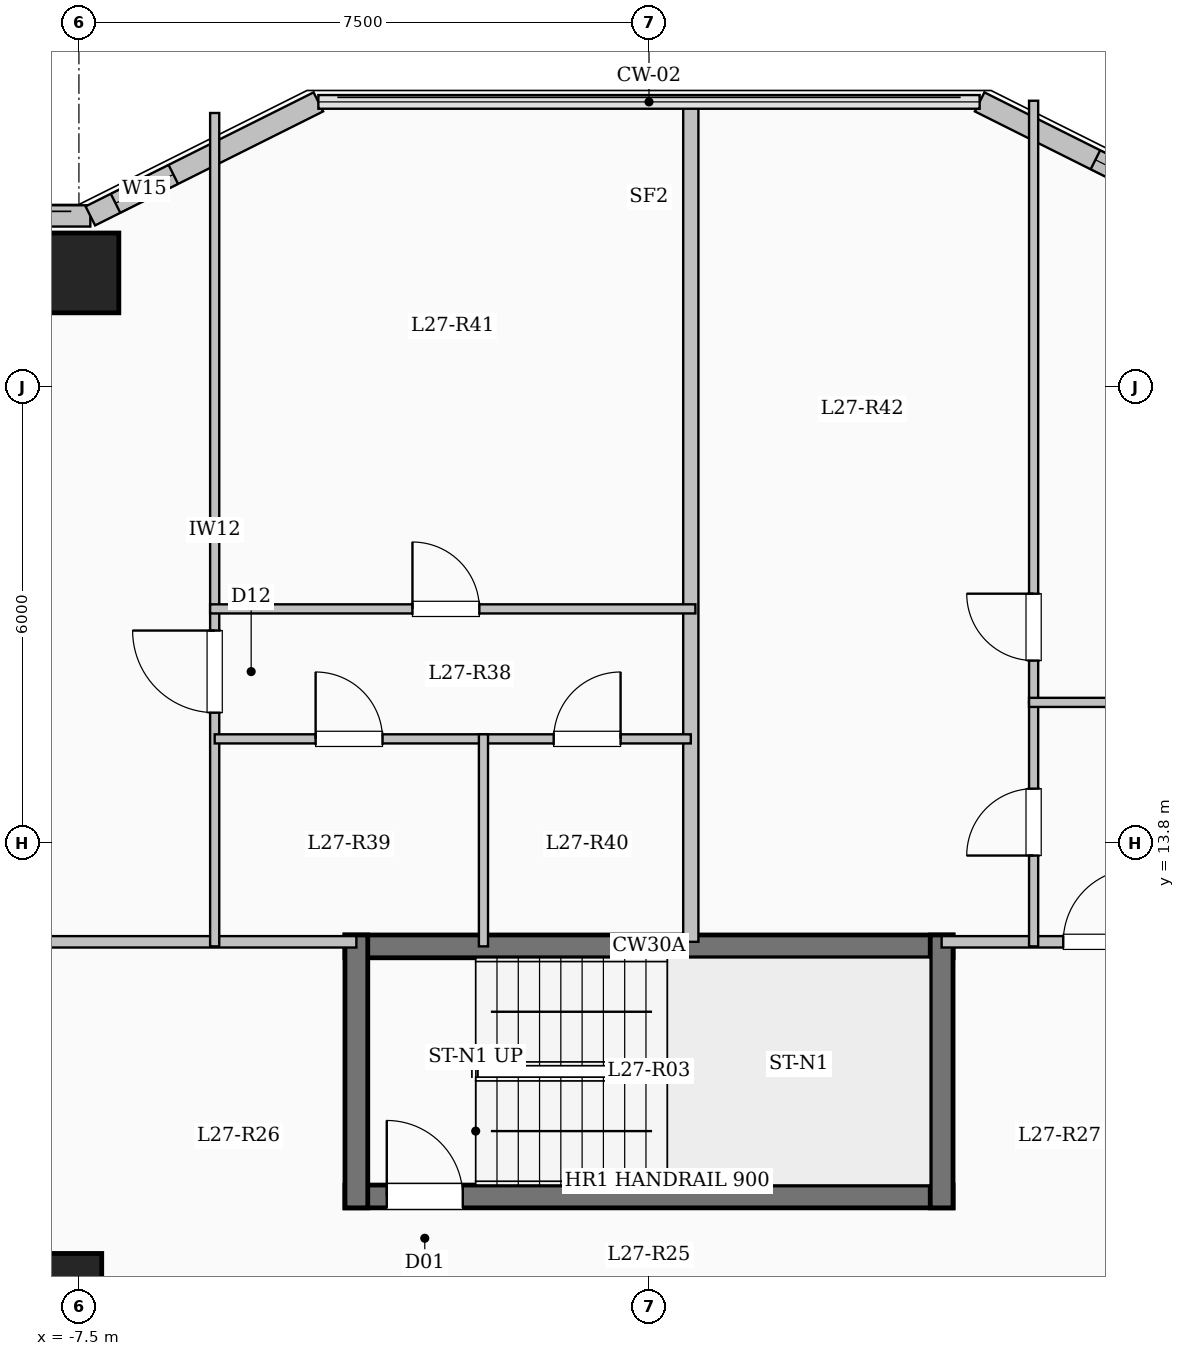
"""IFC4 building model, lengths in metres.
Left out: names, types, materials, properties, quantities, classifications, styles, units other than length and angle.
Written with IfcOpenShell. Run it as: python <this file> out.ifc"""

import sys

from ifc_helpers import new_model, si_unit, direction, frame, frame_2d, origin, origin_2d, place, context, subcontext, project, spatial, rectangle, extrude, element, fill, save


model = new_model("IFC4")
c1 = context("Model", 3, precision=1e-05, world=origin(), true_north=direction((0.0, 1.0)))
c2 = subcontext(c1, "Body", "Model", "MODEL_VIEW")
j1 = project(units=[si_unit("LENGTHUNIT", "METRE"), si_unit("PLANEANGLEUNIT", "RADIAN")], contexts=[c1])
p1 = place(None, origin())
s1 = spatial("IfcSite", under=j1, at=p1, CompositionType="ELEMENT")
p2 = place(p1, origin())
s2 = spatial("IfcBuilding", under=s1, at=p2, CompositionType="ELEMENT")
p3 = place(p2, frame((0.0, 0.0, 101.75)))
s3 = spatial("IfcBuildingStorey", under=s2, at=p3, CompositionType="ELEMENT", Elevation=101.75)
p4 = place(p3, frame((-7.8, 7.8, 0.0), z_axis=(0.0, 0.0, 1.0), x_axis=(1.0, 0.0, 0.0)))
e1 = element("IfcColumn", 1, at=p4, inside=s3, PredefinedType="COLUMN", context=c2, shape_type="SweptSolid", body=[
    extrude(rectangle(XDim=1.2, YDim=1.2, at=origin_2d()), origin(), (0.0, 0.0, 1.0), 3.35),
])
p5 = place(p3, frame((-7.5, 21.3, 0.0), z_axis=(0.0, 0.0, 1.0), x_axis=(1.0, 0.0, 0.0)))
e2 = element("IfcColumn", 2, at=p5, inside=s3, PredefinedType="COLUMN", context=c2, shape_type="SweptSolid", body=[
    extrude(rectangle(XDim=1.05, YDim=1.05, at=origin_2d()), origin(), (0.0, 0.0, 1.0), 3.35),
])
p6 = place(p3, frame((-21.15, 22.05, 0.0), z_axis=(0.0, 0.0, 1.0), x_axis=(1.0, 0.0, 0.0)))
e3 = element("IfcWall", 3, at=p6, inside=s3, PredefinedType="SOLIDWALL", context=c2, shape_type="SweptSolid", body=[
    extrude(rectangle(XDim=13.8, YDim=0.28, at=frame_2d((6.9, 0.0))), origin(), (0.0, 0.0, 1.0), 3.1),
])
p7 = place(p6, frame((1.158, 0.0, 0.9)))
e4 = element("IfcOpeningElement", 4, at=p7, cuts=e3, PredefinedType="OPENING", context=c2, shape_type="SweptSolid", body=[
    extrude(rectangle(XDim=2.4, YDim=1.8, at=frame_2d((1.2, 0.9))), frame((0.0, 0.15, 0.0), z_axis=(0.0, -1.0, 0.0), x_axis=(1.0, 0.0, 0.0)), (0.0, 0.0, 1.0), 0.3),
])
p8 = place(p6, frame((6.0, 0.0, 0.9)))
e5 = element("IfcOpeningElement", 5, at=p8, cuts=e3, PredefinedType="OPENING", context=c2, shape_type="SweptSolid", body=[
    extrude(rectangle(XDim=1.8, YDim=1.65, at=frame_2d((0.9, 0.825))), frame((0.0, 0.15, 0.0), z_axis=(0.0, -1.0, 0.0), x_axis=(1.0, 0.0, 0.0)), (0.0, 0.0, 1.0), 0.3),
])
p9 = place(p6, frame((10.342, 0.0, 0.9)))
e6 = element("IfcOpeningElement", 6, at=p9, cuts=e3, PredefinedType="OPENING", context=c2, shape_type="SweptSolid", body=[
    extrude(rectangle(XDim=2.4, YDim=1.8, at=frame_2d((1.2, 0.9))), frame((0.0, 0.15, 0.0), z_axis=(0.0, -1.0, 0.0), x_axis=(1.0, 0.0, 0.0)), (0.0, 0.0, 1.0), 0.3),
])
p10 = place(p3, frame((-7.35, 22.05, 0.0), z_axis=(0.0, 0.0, 1.0), x_axis=(0.894427191, 0.4472135955, 0.0)))
e7 = element("IfcWall", 7, at=p10, inside=s3, PredefinedType="SOLIDWALL", context=c2, shape_type="SweptSolid", body=[
    extrude(rectangle(XDim=3.354, YDim=0.28, at=frame_2d((1.677, 0.0))), origin(), (0.0, 0.0, 1.0), 3.1),
])
p11 = place(p10, frame((0.371, 0.0, 0.95)))
e8 = element("IfcOpeningElement", 8, at=p11, cuts=e7, PredefinedType="OPENING", context=c2, shape_type="SweptSolid", body=[
    extrude(rectangle(XDim=0.85, YDim=1.5, at=frame_2d((0.425, 0.75))), frame((0.0, 0.15, 0.0), z_axis=(0.0, -1.0, 0.0), x_axis=(1.0, 0.0, 0.0)), (0.0, 0.0, 1.0), 0.3),
])
p12 = place(p3, frame((4.35, 23.55, 0.0), z_axis=(0.0, 0.0, 1.0), x_axis=(0.894427191, -0.4472135955, 0.0)))
e9 = element("IfcWall", 9, at=p12, inside=s3, PredefinedType="SOLIDWALL", context=c2, shape_type="SweptSolid", body=[
    extrude(rectangle(XDim=3.354, YDim=0.28, at=frame_2d((1.677, 0.0))), origin(), (0.0, 0.0, 1.0), 3.1),
])
p13 = place(p12, frame((1.703, 0.0, 0.95)))
e10 = element("IfcOpeningElement", 10, at=p13, cuts=e9, PredefinedType="OPENING", context=c2, shape_type="SweptSolid", body=[
    extrude(rectangle(XDim=1.2, YDim=1.5, at=frame_2d((0.6, 0.75))), frame((0.0, 0.15, 0.0), z_axis=(0.0, -1.0, 0.0), x_axis=(1.0, 0.0, 0.0)), (0.0, 0.0, 1.0), 0.3),
])
p14 = place(p3, frame((-4.0, 12.44, 0.0), z_axis=(0.0, 0.0, 1.0), x_axis=(1.0, 0.0, 0.0)))
e11 = element("IfcWall", 11, at=p14, inside=s3, PredefinedType="SHEAR", context=c2, shape_type="SweptSolid", body=[
    extrude(rectangle(XDim=8.0, YDim=0.3, at=frame_2d((4.0, 0.0))), origin(), (0.0, 0.0, 1.0), 3.35),
])
p15 = place(p3, frame((-4.0, 9.15, 0.0), z_axis=(0.0, 0.0, 1.0), x_axis=(1.0, 0.0, 0.0)))
e12 = element("IfcWall", 12, at=p15, inside=s3, PredefinedType="SHEAR", context=c2, shape_type="SweptSolid", body=[
    extrude(rectangle(XDim=8.0, YDim=0.3, at=frame_2d((4.0, 0.0))), origin(), (0.0, 0.0, 1.0), 3.35),
])
p16 = place(p15, frame((0.55, 0.0, 0.0)))
e13 = element("IfcOpeningElement", 13, at=p16, cuts=e12, PredefinedType="OPENING", context=c2, shape_type="SweptSolid", body=[
    extrude(rectangle(XDim=1.0, YDim=2.15, at=frame_2d((0.5, 1.075))), frame((0.0, 0.16, 0.0), z_axis=(0.0, -1.0, 0.0), x_axis=(1.0, 0.0, 0.0)), (0.0, 0.0, 1.0), 0.32),
])
for number, where, z_axis, x_axis in (
    (14, (-3.85, 9.0, 0.0), (0.0, 0.0, 1.0), (0.0, 1.0, 0.0)),
    (15, (3.85, 9.0, 0.0), (0.0, 0.0, 1.0), (0.0, 1.0, 0.0)),
):
    element("IfcWall", number, at=place(p3, frame(where, z_axis=z_axis, x_axis=x_axis)), inside=s3, PredefinedType="SHEAR", context=c2, shape_type="SweptSolid", body=[
        extrude(rectangle(XDim=3.59, YDim=0.3, at=frame_2d((1.795, 0.0))), origin(), (0.0, 0.0, 1.0), 3.35),
    ])
p17 = place(p3, frame((-21.05, 12.5, 0.0), z_axis=(0.0, 0.0, 1.0), x_axis=(1.0, 0.0, 0.0)))
e16 = element("IfcWall", 16, at=p17, inside=s3, PredefinedType="PARTITIONING", context=c2, shape_type="SweptSolid", body=[
    extrude(rectangle(XDim=17.2, YDim=0.15, at=frame_2d((8.6, 0.0))), origin(), (0.0, 0.0, 1.0), 3.1),
])
p18 = place(p17, frame((0.7, 0.0, 0.0)))
e17 = element("IfcOpeningElement", 17, at=p18, cuts=e16, PredefinedType="OPENING", context=c2, shape_type="SweptSolid", body=[
    extrude(rectangle(XDim=0.96, YDim=2.15, at=frame_2d((0.48, 1.075))), frame((0.0, 0.085, 0.0), z_axis=(0.0, -1.0, 0.0), x_axis=(1.0, 0.0, 0.0)), (0.0, 0.0, 1.0), 0.17),
])
p19 = place(p17, frame((9.772, 0.0, 0.0)))
e18 = element("IfcOpeningElement", 18, at=p19, cuts=e16, PredefinedType="OPENING", context=c2, shape_type="SweptSolid", body=[
    extrude(rectangle(XDim=0.96, YDim=2.15, at=frame_2d((0.48, 1.075))), frame((0.0, 0.085, 0.0), z_axis=(0.0, -1.0, 0.0), x_axis=(1.0, 0.0, 0.0)), (0.0, 0.0, 1.0), 0.17),
])
p20 = place(p3, frame((3.85, 12.5, 0.0), z_axis=(0.0, 0.0, 1.0), x_axis=(1.0, 0.0, 0.0)))
e19 = element("IfcWall", 19, at=p20, inside=s3, PredefinedType="PARTITIONING", context=c2, shape_type="SweptSolid", body=[
    extrude(rectangle(XDim=17.2, YDim=0.15, at=frame_2d((8.6, 0.0))), origin(), (0.0, 0.0, 1.0), 3.1),
])
p21 = place(p20, frame((1.6, 0.0, 0.0)))
e20 = element("IfcOpeningElement", 20, at=p21, cuts=e19, PredefinedType="OPENING", context=c2, shape_type="SweptSolid", body=[
    extrude(rectangle(XDim=0.96, YDim=2.15, at=frame_2d((0.48, 1.075))), frame((0.0, 0.085, 0.0), z_axis=(0.0, -1.0, 0.0), x_axis=(1.0, 0.0, 0.0)), (0.0, 0.0, 1.0), 0.17),
])
p22 = place(p20, frame((6.42, 0.0, 0.0)))
e21 = element("IfcOpeningElement", 21, at=p22, cuts=e19, PredefinedType="OPENING", context=c2, shape_type="SweptSolid", body=[
    extrude(rectangle(XDim=0.96, YDim=2.15, at=frame_2d((0.48, 1.075))), frame((0.0, 0.085, 0.0), z_axis=(0.0, -1.0, 0.0), x_axis=(1.0, 0.0, 0.0)), (0.0, 0.0, 1.0), 0.17),
])
p23 = place(p3, frame((0.55, 12.5, 0.0), z_axis=(0.0, 0.0, 1.0), x_axis=(0.0, 1.0, 0.0)))
e22 = element("IfcWall", 22, at=p23, inside=s3, PredefinedType="SOLIDWALL", context=c2, shape_type="SweptSolid", body=[
    extrude(rectangle(XDim=11.08, YDim=0.2, at=frame_2d((5.54, 0.0))), origin(), (0.0, 0.0, 1.0), 3.1),
])
p24 = place(p3, frame((-5.714, 12.44, 0.0), z_axis=(0.0, 0.0, 1.0), x_axis=(0.0, 1.0, 0.0)))
e23 = element("IfcWall", 23, at=p24, inside=s3, PredefinedType="PARTITIONING", context=c2, shape_type="SweptSolid", body=[
    extrude(rectangle(XDim=10.964, YDim=0.12, at=frame_2d((5.482, 0.0))), origin(), (0.0, 0.0, 1.0), 3.1),
])
p25 = place(p24, frame((3.075, 0.0, 0.0)))
e24 = element("IfcOpeningElement", 24, at=p25, cuts=e23, PredefinedType="OPENING", context=c2, shape_type="SweptSolid", body=[
    extrude(rectangle(XDim=1.08, YDim=2.15, at=frame_2d((0.54, 1.075))), frame((0.0, 0.07, 0.0), z_axis=(0.0, -1.0, 0.0), x_axis=(1.0, 0.0, 0.0)), (0.0, 0.0, 1.0), 0.14),
])
p26 = place(p3, frame((-5.714, 15.17, 0.0), z_axis=(0.0, 0.0, 1.0), x_axis=(1.0, 0.0, 0.0)))
e25 = element("IfcWall", 25, at=p26, inside=s3, PredefinedType="PARTITIONING", context=c2, shape_type="SweptSolid", body=[
    extrude(rectangle(XDim=3.536, YDim=0.12, at=frame_2d((1.768, 0.0))), origin(), (0.0, 0.0, 1.0), 3.1),
])
p27 = place(p26, frame((1.328, 0.0, 0.0)))
e26 = element("IfcOpeningElement", 26, at=p27, cuts=e25, PredefinedType="OPENING", context=c2, shape_type="SweptSolid", body=[
    extrude(rectangle(XDim=0.88, YDim=2.1, at=frame_2d((0.44, 1.05))), frame((0.0, 0.07, 0.0), z_axis=(0.0, -1.0, 0.0), x_axis=(1.0, 0.0, 0.0)), (0.0, 0.0, 1.0), 0.14),
])
p28 = place(p3, frame((-2.178, 15.17, 0.0), z_axis=(0.0, 0.0, 1.0), x_axis=(1.0, 0.0, 0.0)))
e27 = element("IfcWall", 27, at=p28, inside=s3, PredefinedType="PARTITIONING", context=c2, shape_type="SweptSolid", body=[
    extrude(rectangle(XDim=2.728, YDim=0.12, at=frame_2d((1.364, 0.0))), origin(), (0.0, 0.0, 1.0), 3.1),
])
p29 = place(p28, frame((0.924, 0.0, 0.0)))
e28 = element("IfcOpeningElement", 28, at=p29, cuts=e27, PredefinedType="OPENING", context=c2, shape_type="SweptSolid", body=[
    extrude(rectangle(XDim=0.88, YDim=2.1, at=frame_2d((0.44, 1.05))), frame((0.0, 0.07, 0.0), z_axis=(0.0, -1.0, 0.0), x_axis=(1.0, 0.0, 0.0)), (0.0, 0.0, 1.0), 0.14),
])
p30 = place(p3, frame((-5.774, 16.88, 0.0), z_axis=(0.0, 0.0, 1.0), x_axis=(1.0, 0.0, 0.0)))
e29 = element("IfcWall", 29, at=p30, inside=s3, PredefinedType="PARTITIONING", context=c2, shape_type="SweptSolid", body=[
    extrude(rectangle(XDim=6.384, YDim=0.12, at=frame_2d((3.192, 0.0))), origin(), (0.0, 0.0, 1.0), 3.1),
])
p31 = place(p30, frame((2.662, 0.0, 0.0)))
e30 = element("IfcOpeningElement", 30, at=p31, cuts=e29, PredefinedType="OPENING", context=c2, shape_type="SweptSolid", body=[
    extrude(rectangle(XDim=0.88, YDim=2.1, at=frame_2d((0.44, 1.05))), frame((0.0, 0.07, 0.0), z_axis=(0.0, -1.0, 0.0), x_axis=(1.0, 0.0, 0.0)), (0.0, 0.0, 1.0), 0.14),
])
p32 = place(p3, frame((-2.178, 12.44, 0.0), z_axis=(0.0, 0.0, 1.0), x_axis=(0.0, 1.0, 0.0)))
e31 = element("IfcWall", 31, at=p32, inside=s3, PredefinedType="PARTITIONING", context=c2, shape_type="SweptSolid", body=[
    extrude(rectangle(XDim=2.79, YDim=0.12, at=frame_2d((1.395, 0.0))), origin(), (0.0, 0.0, 1.0), 3.1),
])
p33 = place(p3, frame((5.06, 12.44, 0.0), z_axis=(0.0, 0.0, 1.0), x_axis=(0.0, 1.0, 0.0)))
e32 = element("IfcWall", 32, at=p33, inside=s3, PredefinedType="PARTITIONING", context=c2, shape_type="SweptSolid", body=[
    extrude(rectangle(XDim=3.21, YDim=0.12, at=frame_2d((1.605, 0.0))), origin(), (0.0, 0.0, 1.0), 3.1),
])
p34 = place(p33, frame((1.195, 0.0, 0.0)))
e33 = element("IfcOpeningElement", 33, at=p34, cuts=e32, PredefinedType="OPENING", context=c2, shape_type="SweptSolid", body=[
    extrude(rectangle(XDim=0.88, YDim=2.1, at=frame_2d((0.44, 1.05))), frame((0.0, 0.07, 0.0), z_axis=(0.0, -1.0, 0.0), x_axis=(1.0, 0.0, 0.0)), (0.0, 0.0, 1.0), 0.14),
])
p35 = place(p3, frame((5.06, 15.65, 0.0), z_axis=(0.0, 0.0, 1.0), x_axis=(0.0, 1.0, 0.0)))
e34 = element("IfcWall", 34, at=p35, inside=s3, PredefinedType="PARTITIONING", context=c2, shape_type="SweptSolid", body=[
    extrude(rectangle(XDim=7.915, YDim=0.12, at=frame_2d((3.958, 0.0))), origin(), (0.0, 0.0, 1.0), 3.1),
])
p36 = place(p35, frame((0.55, 0.0, 0.0)))
e35 = element("IfcOpeningElement", 35, at=p36, cuts=e34, PredefinedType="OPENING", context=c2, shape_type="SweptSolid", body=[
    extrude(rectangle(XDim=0.88, YDim=2.1, at=frame_2d((0.44, 1.05))), frame((0.0, 0.07, 0.0), z_axis=(0.0, -1.0, 0.0), x_axis=(1.0, 0.0, 0.0)), (0.0, 0.0, 1.0), 0.14),
])
p37 = place(p3, frame((5.0, 15.65, 0.0), z_axis=(0.0, 0.0, 1.0), x_axis=(1.0, 0.0, 0.0)))
e36 = element("IfcWall", 36, at=p37, inside=s3, PredefinedType="PARTITIONING", context=c2, shape_type="SweptSolid", body=[
    extrude(rectangle(XDim=4.63, YDim=0.12, at=frame_2d((2.315, 0.0))), origin(), (0.0, 0.0, 1.0), 3.1),
])
p38 = place(p11, origin())
e37 = element("IfcWindow", 37, at=p38, inside=s3, PartitioningType="SINGLE_PANEL", PredefinedType="WINDOW", context=c2, shape_type="SweptSolid", body=[
    extrude(rectangle(XDim=0.85, YDim=1.5, at=frame_2d((0.425, 0.75))), frame((0.0, 0.03, 0.0), z_axis=(0.0, -1.0, 0.0), x_axis=(1.0, 0.0, 0.0)), (0.0, 0.0, 1.0), 0.06),
])
fill(e8, e37)
p39 = place(p13, origin())
e38 = element("IfcWindow", 38, at=p39, inside=s3, PartitioningType="SINGLE_PANEL", PredefinedType="WINDOW", context=c2, shape_type="SweptSolid", body=[
    extrude(rectangle(XDim=1.2, YDim=1.5, at=frame_2d((0.6, 0.75))), frame((0.0, 0.03, 0.0), z_axis=(0.0, -1.0, 0.0), x_axis=(1.0, 0.0, 0.0)), (0.0, 0.0, 1.0), 0.06),
])
fill(e10, e38)
p40 = place(p16, origin())
e39 = element("IfcDoor", 39, at=p40, inside=s3, OperationType="SINGLE_SWING_LEFT", PredefinedType="DOOR", context=c2, shape_type="SweptSolid", body=[
    extrude(rectangle(XDim=1.0, YDim=2.15, at=frame_2d((0.5, 1.075))), frame((0.0, 0.025, 0.0), z_axis=(0.0, -1.0, 0.0), x_axis=(1.0, 0.0, 0.0)), (0.0, 0.0, 1.0), 0.05),
])
fill(e13, e39)
p41 = place(p25, origin())
e40 = element("IfcDoor", 40, at=p41, inside=s3, OperationType="SINGLE_SWING_RIGHT", PredefinedType="DOOR", context=c2, shape_type="SweptSolid", body=[
    extrude(rectangle(XDim=1.08, YDim=2.15, at=frame_2d((0.54, 1.075))), frame((0.0, 0.025, 0.0), z_axis=(0.0, -1.0, 0.0), x_axis=(1.0, 0.0, 0.0)), (0.0, 0.0, 1.0), 0.05),
])
fill(e24, e40)
p42 = place(p27, origin())
e41 = element("IfcDoor", 41, at=p42, inside=s3, OperationType="SINGLE_SWING_LEFT", PredefinedType="DOOR", context=c2, shape_type="SweptSolid", body=[
    extrude(rectangle(XDim=0.88, YDim=2.1, at=frame_2d((0.44, 1.05))), frame((0.0, 0.025, 0.0), z_axis=(0.0, -1.0, 0.0), x_axis=(1.0, 0.0, 0.0)), (0.0, 0.0, 1.0), 0.05),
])
fill(e26, e41)
p43 = place(p29, origin())
e42 = element("IfcDoor", 42, at=p43, inside=s3, OperationType="SINGLE_SWING_RIGHT", PredefinedType="DOOR", context=c2, shape_type="SweptSolid", body=[
    extrude(rectangle(XDim=0.88, YDim=2.1, at=frame_2d((0.44, 1.05))), frame((0.0, 0.025, 0.0), z_axis=(0.0, -1.0, 0.0), x_axis=(1.0, 0.0, 0.0)), (0.0, 0.0, 1.0), 0.05),
])
fill(e28, e42)
p44 = place(p31, origin())
e43 = element("IfcDoor", 43, at=p44, inside=s3, OperationType="SINGLE_SWING_LEFT", PredefinedType="DOOR", context=c2, shape_type="SweptSolid", body=[
    extrude(rectangle(XDim=0.88, YDim=2.1, at=frame_2d((0.44, 1.05))), frame((0.0, 0.025, 0.0), z_axis=(0.0, -1.0, 0.0), x_axis=(1.0, 0.0, 0.0)), (0.0, 0.0, 1.0), 0.05),
])
fill(e30, e43)
p45 = place(p21, origin())
e44 = element("IfcDoor", 44, at=p45, inside=s3, OperationType="SINGLE_SWING_RIGHT", PredefinedType="DOOR", context=c2, shape_type="SweptSolid", body=[
    extrude(rectangle(XDim=0.96, YDim=2.15, at=frame_2d((0.48, 1.075))), frame((0.0, 0.025, 0.0), z_axis=(0.0, -1.0, 0.0), x_axis=(1.0, 0.0, 0.0)), (0.0, 0.0, 1.0), 0.05),
])
fill(e20, e44)
p46 = place(p34, origin())
e45 = element("IfcDoor", 45, at=p46, inside=s3, OperationType="SINGLE_SWING_LEFT", PredefinedType="DOOR", context=c2, shape_type="SweptSolid", body=[
    extrude(rectangle(XDim=0.88, YDim=2.1, at=frame_2d((0.44, 1.05))), frame((0.0, 0.025, 0.0), z_axis=(0.0, -1.0, 0.0), x_axis=(1.0, 0.0, 0.0)), (0.0, 0.0, 1.0), 0.05),
])
fill(e33, e45)
p47 = place(p36, origin())
e46 = element("IfcDoor", 46, at=p47, inside=s3, OperationType="SINGLE_SWING_RIGHT", PredefinedType="DOOR", context=c2, shape_type="SweptSolid", body=[
    extrude(rectangle(XDim=0.88, YDim=2.1, at=frame_2d((0.44, 1.05))), frame((0.0, 0.025, 0.0), z_axis=(0.0, -1.0, 0.0), x_axis=(1.0, 0.0, 0.0)), (0.0, 0.0, 1.0), 0.05),
])
fill(e35, e46)
save(model, sys.argv[1])
